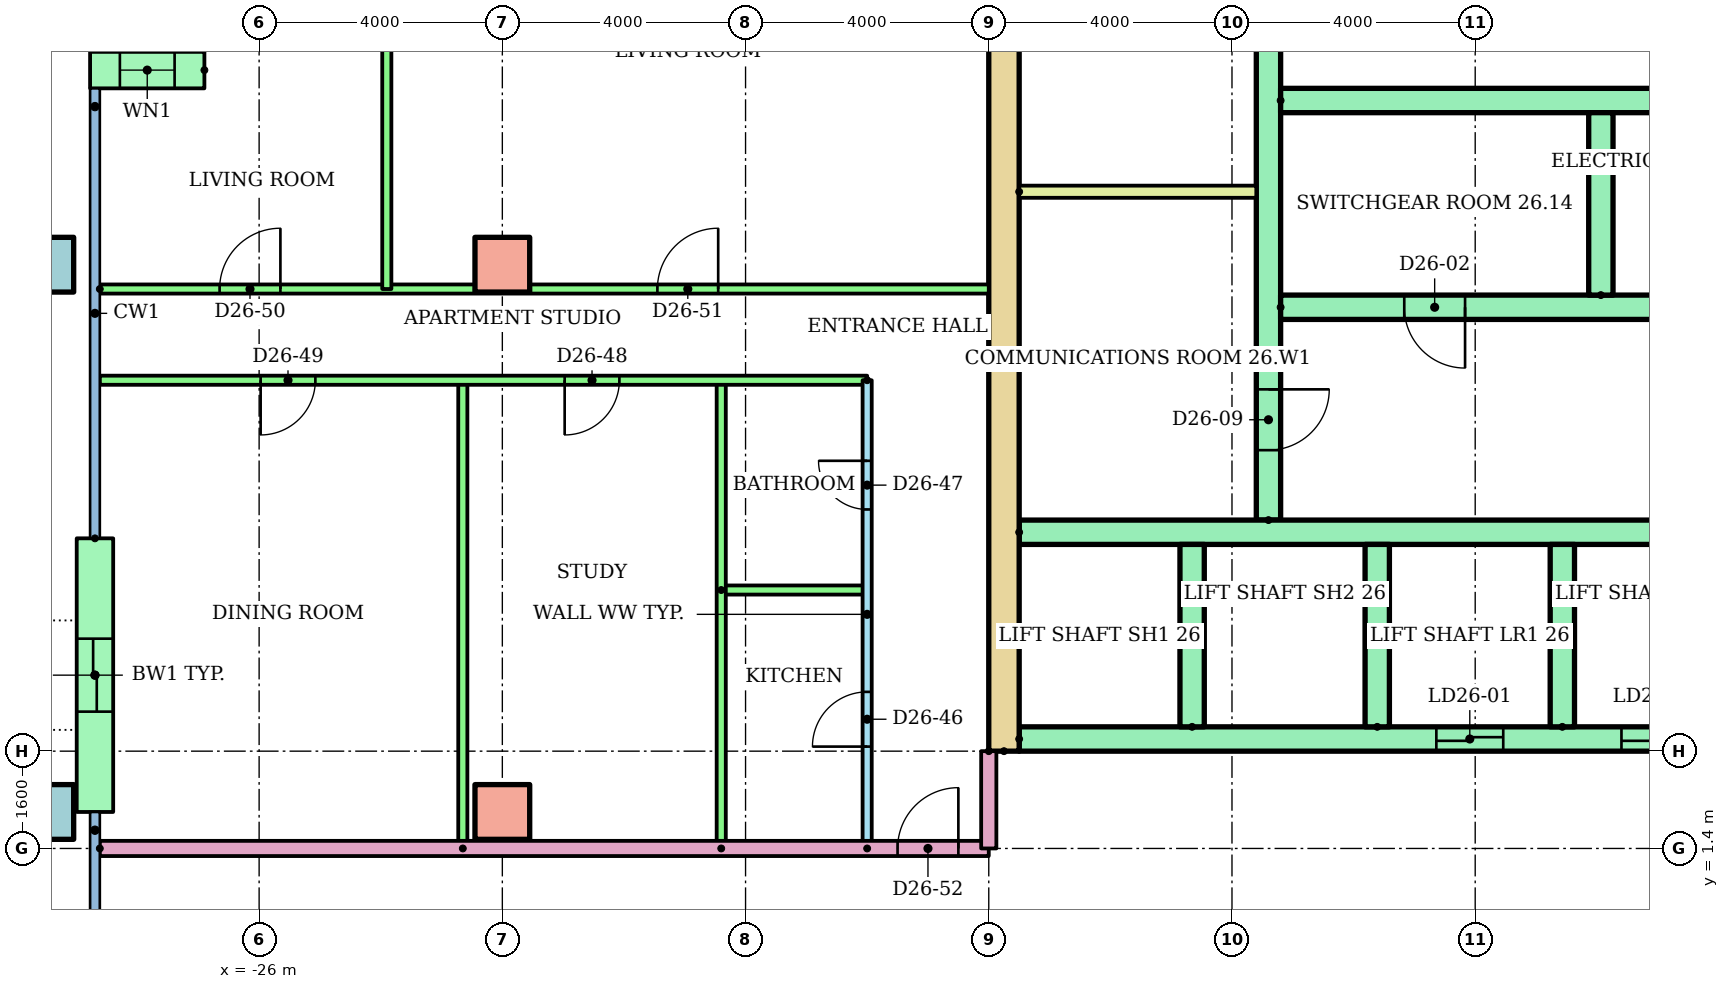
"""IFC4 building model, lengths in metres.
Left out: names, types, materials, properties, quantities, classifications, styles, units other than length and angle.
Written with IfcOpenShell. Run it as: python <this file> out.ifc"""

import sys

from ifc_helpers import new_model, si_unit, direction, frame, frame_2d, origin, origin_2d, place, context, subcontext, project, spatial, rectangle, hollow_rectangle, extrude, element, fill, save


model = new_model("IFC4")
c1 = context("Model", 3, precision=1e-05, world=origin(), true_north=direction((0.0, 1.0)))
c2 = subcontext(c1, "Body", "Model", "MODEL_VIEW")
j1 = project(units=[si_unit("LENGTHUNIT", "METRE"), si_unit("PLANEANGLEUNIT", "RADIAN")], contexts=[c1])
p1 = place(None, origin())
s1 = spatial("IfcSite", under=j1, at=p1, CompositionType="ELEMENT")
p2 = place(p1, origin())
s2 = spatial("IfcBuilding", under=s1, at=p2, CompositionType="ELEMENT")
p3 = place(p2, frame((0.0, 0.0, 99.9)))
s3 = spatial("IfcBuildingStorey", under=s2, at=p3, CompositionType="ELEMENT", Elevation=99.9)
p4 = place(p3, frame((-29.5, 2.0, 0.0)))
e1 = element("IfcColumn", 1, at=p4, inside=s3, PredefinedType="COLUMN", context=c2, shape_type="SweptSolid", body=[
    extrude(hollow_rectangle(XDim=0.9, YDim=0.9, WallThickness=0.045, at=origin_2d()), origin(), (0.0, 0.0, 1.0), 3.2),
])
p5 = place(p3, frame((-22.0, 2.0, 0.0)))
e2 = element("IfcColumn", 2, at=p5, inside=s3, PredefinedType="COLUMN", context=c2, shape_type="SweptSolid", body=[
    extrude(rectangle(XDim=0.9, YDim=0.9, at=origin_2d()), origin(), (0.0, 0.0, 1.0), 3.2),
])
p6 = place(p3, frame((-29.5, 11.0, 0.0)))
e3 = element("IfcColumn", 3, at=p6, inside=s3, PredefinedType="COLUMN", context=c2, shape_type="SweptSolid", body=[
    extrude(hollow_rectangle(XDim=0.9, YDim=0.9, WallThickness=0.045, at=origin_2d()), origin(), (0.0, 0.0, 1.0), 3.2),
])
p7 = place(p3, frame((-22.0, 11.0, 0.0)))
e4 = element("IfcColumn", 4, at=p7, inside=s3, PredefinedType="COLUMN", context=c2, shape_type="SweptSolid", body=[
    extrude(rectangle(XDim=0.9, YDim=0.9, at=origin_2d()), origin(), (0.0, 0.0, 1.0), 3.2),
])
p8 = place(p3, frame((-26.9, 14.2, 0.0), z_axis=(0.0, 0.0, 1.0), x_axis=(-1.0, 0.0, 0.0)))
e5 = element("IfcWall", 5, at=p8, inside=s3, PredefinedType="STANDARD", context=c2, shape_type="SweptSolid", body=[
    extrude(rectangle(XDim=1.88, YDim=0.6, at=frame_2d((0.94, 0.0))), origin(), (0.0, 0.0, 1.0), 2.92),
])
p9 = place(p8, frame((0.49, 0.0, 0.9)))
e6 = element("IfcOpeningElement", 6, at=p9, cuts=e5, PredefinedType="OPENING", context=c2, shape_type="SweptSolid", body=[
    extrude(rectangle(XDim=0.9, YDim=1.5, at=frame_2d((0.45, 0.75))), frame((0.0, 0.31, 0.0), z_axis=(0.0, -1.0, 0.0), x_axis=(1.0, 0.0, 0.0)), (0.0, 0.0, 1.0), 0.62),
])
p10 = place(p3, frame((-28.7, 6.5, 0.0), z_axis=(0.0, 0.0, 1.0), x_axis=(0.0, -1.0, 0.0)))
e7 = element("IfcWall", 7, at=p10, inside=s3, PredefinedType="STANDARD", context=c2, shape_type="SweptSolid", body=[
    extrude(rectangle(XDim=4.5, YDim=0.6, at=frame_2d((2.25, 0.0))), origin(), (0.0, 0.0, 1.0), 2.92),
])
p11 = place(p10, frame((1.65, 0.0, 0.0)))
e8 = element("IfcOpeningElement", 8, at=p11, cuts=e7, PredefinedType="OPENING", context=c2, shape_type="SweptSolid", body=[
    extrude(rectangle(XDim=1.2, YDim=2.1, at=frame_2d((0.6, 1.05))), frame((0.0, 0.31, 0.0), z_axis=(0.0, -1.0, 0.0), x_axis=(1.0, 0.0, 0.0)), (0.0, 0.0, 1.0), 0.62),
])
p12 = place(p3, frame((-13.75, 3.0, 0.0), z_axis=(0.0, 0.0, 1.0), x_axis=(0.0, 1.0, 0.0)))
e9 = element("IfcWall", 9, at=p12, inside=s3, PredefinedType="SHEAR", context=c2, shape_type="SweptSolid", body=[
    extrude(rectangle(XDim=17.0, YDim=0.5, at=frame_2d((8.5, 0.0))), origin(), (0.0, 0.0, 1.0), 2.92),
])
p13 = place(p3, frame((-9.4, 6.8, 0.0), z_axis=(0.0, 0.0, 1.0), x_axis=(0.0, 1.0, 0.0)))
e10 = element("IfcWall", 10, at=p13, inside=s3, PredefinedType="SHEAR", context=c2, shape_type="SweptSolid", body=[
    extrude(rectangle(XDim=12.7, YDim=0.4, at=frame_2d((6.35, 0.0))), origin(), (0.0, 0.0, 1.0), 2.92),
])
p14 = place(p13, frame((1.15, 0.0, 0.0)))
e11 = element("IfcOpeningElement", 11, at=p14, cuts=e10, PredefinedType="OPENING", context=c2, shape_type="SweptSolid", body=[
    extrude(rectangle(XDim=1.0, YDim=2.1, at=frame_2d((0.5, 1.05))), frame((0.0, 0.21, 0.0), z_axis=(0.0, -1.0, 0.0), x_axis=(1.0, 0.0, 0.0)), (0.0, 0.0, 1.0), 0.42),
])
p15 = place(p13, frame((7.925, 0.0, 0.0)))
e12 = element("IfcOpeningElement", 12, at=p15, cuts=e10, PredefinedType="OPENING", context=c2, shape_type="SweptSolid", body=[
    extrude(rectangle(XDim=1.0, YDim=2.1, at=frame_2d((0.5, 1.05))), frame((0.0, 0.21, 0.0), z_axis=(0.0, -1.0, 0.0), x_axis=(1.0, 0.0, 0.0)), (0.0, 0.0, 1.0), 0.42),
])
p16 = place(p3, frame((-13.5, 3.2, 0.0)))
e13 = element("IfcWall", 13, at=p16, inside=s3, PredefinedType="SHEAR", context=c2, shape_type="SweptSolid", body=[
    extrude(rectangle(XDim=27.0, YDim=0.4, at=frame_2d((13.5, 0.0))), origin(), (0.0, 0.0, 1.0), 2.92),
])
p17 = place(p16, frame((6.861, 0.0, 0.0)))
e14 = element("IfcOpeningElement", 14, at=p17, cuts=e13, PredefinedType="OPENING", context=c2, shape_type="SweptSolid", body=[
    extrude(rectangle(XDim=1.1, YDim=2.1, at=frame_2d((0.55, 1.05))), frame((0.0, 0.21, 0.0), z_axis=(0.0, -1.0, 0.0), x_axis=(1.0, 0.0, 0.0)), (0.0, 0.0, 1.0), 0.42),
])
p18 = place(p16, frame((9.906, 0.0, 0.0)))
e15 = element("IfcOpeningElement", 15, at=p18, cuts=e13, PredefinedType="OPENING", context=c2, shape_type="SweptSolid", body=[
    extrude(rectangle(XDim=1.1, YDim=2.1, at=frame_2d((0.55, 1.05))), frame((0.0, 0.21, 0.0), z_axis=(0.0, -1.0, 0.0), x_axis=(1.0, 0.0, 0.0)), (0.0, 0.0, 1.0), 0.42),
])
p19 = place(p16, frame((15.994, 0.0, 0.0)))
e16 = element("IfcOpeningElement", 16, at=p19, cuts=e13, PredefinedType="OPENING", context=c2, shape_type="SweptSolid", body=[
    extrude(rectangle(XDim=1.1, YDim=2.1, at=frame_2d((0.55, 1.05))), frame((0.0, 0.21, 0.0), z_axis=(0.0, -1.0, 0.0), x_axis=(1.0, 0.0, 0.0)), (0.0, 0.0, 1.0), 0.42),
])
p20 = place(p16, frame((19.039, 0.0, 0.0)))
e17 = element("IfcOpeningElement", 17, at=p20, cuts=e13, PredefinedType="OPENING", context=c2, shape_type="SweptSolid", body=[
    extrude(rectangle(XDim=1.1, YDim=2.1, at=frame_2d((0.55, 1.05))), frame((0.0, 0.21, 0.0), z_axis=(0.0, -1.0, 0.0), x_axis=(1.0, 0.0, 0.0)), (0.0, 0.0, 1.0), 0.42),
])
p21 = place(p16, frame((12.6, 0.0, 0.0)))
e18 = element("IfcOpeningElement", 18, at=p21, cuts=e13, PredefinedType="OPENING", context=c2, shape_type="SweptSolid", body=[
    extrude(rectangle(XDim=1.8, YDim=2.1, at=frame_2d((0.9, 1.05))), frame((0.0, 0.21, 0.0), z_axis=(0.0, -1.0, 0.0), x_axis=(1.0, 0.0, 0.0)), (0.0, 0.0, 1.0), 0.42),
])
p22 = place(p3, frame((-13.5, 6.6, 0.0)))
e19 = element("IfcWall", 19, at=p22, inside=s3, PredefinedType="SHEAR", context=c2, shape_type="SweptSolid", body=[
    extrude(rectangle(XDim=11.978, YDim=0.4, at=frame_2d((5.989, 0.0))), origin(), (0.0, 0.0, 1.0), 2.92),
])
for number, where, z_axis, x_axis in (
    (20, (-10.656, 3.4, 0.0), (0.0, 0.0, 1.0), (0.0, 1.0, 0.0)),
    (21, (-7.611, 3.4, 0.0), (0.0, 0.0, 1.0), (0.0, 1.0, 0.0)),
    (22, (-4.567, 3.4, 0.0), (0.0, 0.0, 1.0), (0.0, 1.0, 0.0)),
):
    element("IfcWall", number, at=place(p3, frame(where, z_axis=z_axis, x_axis=x_axis)), inside=s3, PredefinedType="SHEAR", context=c2, shape_type="SweptSolid", body=[
        extrude(rectangle(XDim=3.0, YDim=0.4, at=frame_2d((1.5, 0.0))), origin(), (0.0, 0.0, 1.0), 2.92),
    ])
p23 = place(p3, frame((-9.2, 10.3, 0.0)))
e23 = element("IfcWall", 23, at=p23, inside=s3, PredefinedType="SHEAR", context=c2, shape_type="SweptSolid", body=[
    extrude(rectangle(XDim=8.0, YDim=0.4, at=frame_2d((4.0, 0.0))), origin(), (0.0, 0.0, 1.0), 2.92),
])
p24 = place(p23, frame((2.033, 0.0, 0.0)))
e24 = element("IfcOpeningElement", 24, at=p24, cuts=e23, PredefinedType="OPENING", context=c2, shape_type="SweptSolid", body=[
    extrude(rectangle(XDim=1.0, YDim=2.1, at=frame_2d((0.5, 1.05))), frame((0.0, 0.21, 0.0), z_axis=(0.0, -1.0, 0.0), x_axis=(1.0, 0.0, 0.0)), (0.0, 0.0, 1.0), 0.42),
])
p25 = place(p23, frame((6.133, 0.0, 0.0)))
e25 = element("IfcOpeningElement", 25, at=p25, cuts=e23, PredefinedType="OPENING", context=c2, shape_type="SweptSolid", body=[
    extrude(rectangle(XDim=1.0, YDim=2.1, at=frame_2d((0.5, 1.05))), frame((0.0, 0.21, 0.0), z_axis=(0.0, -1.0, 0.0), x_axis=(1.0, 0.0, 0.0)), (0.0, 0.0, 1.0), 0.42),
])
p26 = place(p3, frame((-9.2, 13.7, 0.0)))
e26 = element("IfcWall", 26, at=p26, inside=s3, PredefinedType="SHEAR", context=c2, shape_type="SweptSolid", body=[
    extrude(rectangle(XDim=8.0, YDim=0.4, at=frame_2d((4.0, 0.0))), origin(), (0.0, 0.0, 1.0), 2.92),
])
p27 = place(p3, frame((-3.933, 10.5, 0.0), z_axis=(0.0, 0.0, 1.0), x_axis=(0.0, 1.0, 0.0)))
e27 = element("IfcWall", 27, at=p27, inside=s3, PredefinedType="SHEAR", context=c2, shape_type="SweptSolid", body=[
    extrude(rectangle(XDim=3.0, YDim=0.4, at=frame_2d((1.5, 0.0))), origin(), (0.0, 0.0, 1.0), 2.92),
])
p28 = place(p3, frame((-13.5, 12.2, 0.0)))
e28 = element("IfcWall", 28, at=p28, inside=s3, PredefinedType="PARTITIONING", context=c2, shape_type="SweptSolid", body=[
    extrude(rectangle(XDim=3.9, YDim=0.2, at=frame_2d((1.95, 0.0))), origin(), (0.0, 0.0, 1.0), 2.92),
])
p29 = place(p3, frame((-16.0, 1.4, 0.0), z_axis=(0.0, 0.0, 1.0), x_axis=(0.0, 1.0, 0.0)))
e29 = element("IfcWall", 29, at=p29, inside=s3, PredefinedType="PARTITIONING", context=c2, shape_type="SweptSolid", body=[
    extrude(rectangle(XDim=7.7, YDim=0.15, at=frame_2d((3.85, 0.0))), origin(), (0.0, 0.0, 1.0), 2.4),
])
p30 = place(p29, frame((1.675, 0.0, 0.0)))
e30 = element("IfcOpeningElement", 30, at=p30, cuts=e29, PredefinedType="OPENING", context=c2, shape_type="SweptSolid", body=[
    extrude(rectangle(XDim=0.9, YDim=2.1, at=frame_2d((0.45, 1.05))), frame((0.0, 0.085, 0.0), z_axis=(0.0, -1.0, 0.0), x_axis=(1.0, 0.0, 0.0)), (0.0, 0.0, 1.0), 0.17),
])
p31 = place(p29, frame((5.575, 0.0, 0.0)))
e31 = element("IfcOpeningElement", 31, at=p31, cuts=e29, PredefinedType="OPENING", context=c2, shape_type="SweptSolid", body=[
    extrude(rectangle(XDim=0.8, YDim=2.1, at=frame_2d((0.4, 1.05))), frame((0.0, 0.085, 0.0), z_axis=(0.0, -1.0, 0.0), x_axis=(1.0, 0.0, 0.0)), (0.0, 0.0, 1.0), 0.17),
])
p32 = place(p3, frame((-18.4, 5.65, 0.0)))
e32 = element("IfcWall", 32, at=p32, inside=s3, PredefinedType="PARTITIONING", context=c2, shape_type="SweptSolid", body=[
    extrude(rectangle(XDim=2.4, YDim=0.15, at=frame_2d((1.2, 0.0))), origin(), (0.0, 0.0, 1.0), 2.4),
])
for number, where, z_axis, x_axis in (
    (33, (-18.4, 1.4, 0.0), (0.0, 0.0, 1.0), (0.0, 1.0, 0.0)),
    (34, (-22.65, 1.4, 0.0), (0.0, 0.0, 1.0), (0.0, 1.0, 0.0)),
):
    element("IfcWall", number, at=place(p3, frame(where, z_axis=z_axis, x_axis=x_axis)), inside=s3, PredefinedType="PARTITIONING", context=c2, shape_type="SweptSolid", body=[
        extrude(rectangle(XDim=7.7, YDim=0.15, at=frame_2d((3.85, 0.0))), origin(), (0.0, 0.0, 1.0), 2.4),
    ])
p33 = place(p3, frame((-16.0, 9.1, 0.0), z_axis=(0.0, 0.0, 1.0), x_axis=(-1.0, 0.0, 0.0)))
e35 = element("IfcWall", 35, at=p33, inside=s3, PredefinedType="PARTITIONING", context=c2, shape_type="SweptSolid", body=[
    extrude(rectangle(XDim=12.62, YDim=0.15, at=frame_2d((6.31, 0.0))), origin(), (0.0, 0.0, 1.0), 2.4),
])
p34 = place(p33, frame((4.075, 0.0, 0.0)))
e36 = element("IfcOpeningElement", 36, at=p34, cuts=e35, PredefinedType="OPENING", context=c2, shape_type="SweptSolid", body=[
    extrude(rectangle(XDim=0.9, YDim=2.1, at=frame_2d((0.45, 1.05))), frame((0.0, 0.085, 0.0), z_axis=(0.0, -1.0, 0.0), x_axis=(1.0, 0.0, 0.0)), (0.0, 0.0, 1.0), 0.17),
])
p35 = place(p33, frame((9.075, 0.0, 0.0)))
e37 = element("IfcOpeningElement", 37, at=p35, cuts=e35, PredefinedType="OPENING", context=c2, shape_type="SweptSolid", body=[
    extrude(rectangle(XDim=0.9, YDim=2.1, at=frame_2d((0.45, 1.05))), frame((0.0, 0.085, 0.0), z_axis=(0.0, -1.0, 0.0), x_axis=(1.0, 0.0, 0.0)), (0.0, 0.0, 1.0), 0.17),
])
p36 = place(p3, frame((-28.62, 10.6, 0.0)))
e38 = element("IfcWall", 38, at=p36, inside=s3, PredefinedType="PARTITIONING", context=c2, shape_type="SweptSolid", body=[
    extrude(rectangle(XDim=14.62, YDim=0.15, at=frame_2d((7.31, 0.0))), origin(), (0.0, 0.0, 1.0), 2.4),
])
p37 = place(p36, frame((1.97, 0.0, 0.0)))
e39 = element("IfcOpeningElement", 39, at=p37, cuts=e38, PredefinedType="OPENING", context=c2, shape_type="SweptSolid", body=[
    extrude(rectangle(XDim=1.0, YDim=2.1, at=frame_2d((0.5, 1.05))), frame((0.0, 0.085, 0.0), z_axis=(0.0, -1.0, 0.0), x_axis=(1.0, 0.0, 0.0)), (0.0, 0.0, 1.0), 0.17),
])
p38 = place(p36, frame((9.17, 0.0, 0.0)))
e40 = element("IfcOpeningElement", 40, at=p38, cuts=e38, PredefinedType="OPENING", context=c2, shape_type="SweptSolid", body=[
    extrude(rectangle(XDim=1.0, YDim=2.1, at=frame_2d((0.5, 1.05))), frame((0.0, 0.085, 0.0), z_axis=(0.0, -1.0, 0.0), x_axis=(1.0, 0.0, 0.0)), (0.0, 0.0, 1.0), 0.17),
])
p39 = place(p3, frame((-23.9, 16.82, 0.0), z_axis=(0.0, 0.0, 1.0), x_axis=(0.0, -1.0, 0.0)))
e41 = element("IfcWall", 41, at=p39, inside=s3, PredefinedType="PARTITIONING", context=c2, shape_type="SweptSolid", body=[
    extrude(rectangle(XDim=6.22, YDim=0.15, at=frame_2d((3.11, 0.0))), origin(), (0.0, 0.0, 1.0), 2.4),
])
p40 = place(p3, frame((-28.62, 1.4, 0.0)))
e42 = element("IfcWall", 42, at=p40, inside=s3, PredefinedType="PARTITIONING", context=c2, shape_type="SweptSolid", body=[
    extrude(rectangle(XDim=14.62, YDim=0.25, at=frame_2d((7.31, 0.0))), origin(), (0.0, 0.0, 1.0), 2.4),
])
p41 = place(p40, frame((13.12, 0.0, 0.0)))
e43 = element("IfcOpeningElement", 43, at=p41, cuts=e42, PredefinedType="OPENING", context=c2, shape_type="SweptSolid", body=[
    extrude(rectangle(XDim=1.0, YDim=2.1, at=frame_2d((0.5, 1.05))), frame((0.0, 0.135, 0.0), z_axis=(0.0, -1.0, 0.0), x_axis=(1.0, 0.0, 0.0)), (0.0, 0.0, 1.0), 0.27),
])
p42 = place(p3, frame((-14.0, 3.0, 0.0), z_axis=(0.0, 0.0, 1.0), x_axis=(0.0, -1.0, 0.0)))
e44 = element("IfcWall", 44, at=p42, inside=s3, PredefinedType="PARTITIONING", context=c2, shape_type="SweptSolid", body=[
    extrude(rectangle(XDim=1.6, YDim=0.25, at=frame_2d((0.8, 0.0))), origin(), (0.0, 0.0, 1.0), 2.4),
])
p43 = place(p9, origin())
e45 = element("IfcWindow", 45, at=p43, inside=s3, PartitioningType="SINGLE_PANEL", PredefinedType="WINDOW", context=c2, shape_type="SweptSolid", body=[
    extrude(rectangle(XDim=0.9, YDim=1.5, at=frame_2d((0.45, 0.75))), frame((0.0, 0.03, 0.0), z_axis=(0.0, -1.0, 0.0), x_axis=(1.0, 0.0, 0.0)), (0.0, 0.0, 1.0), 0.06),
])
fill(e6, e45)
p44 = place(p17, origin())
e46 = element("IfcDoor", 46, at=p44, inside=s3, OperationType="SLIDING_TO_LEFT", PredefinedType="DOOR", context=c2, shape_type="SweptSolid", body=[
    extrude(rectangle(XDim=1.1, YDim=2.1, at=frame_2d((0.55, 1.05))), frame((0.0, 0.025, 0.0), z_axis=(0.0, -1.0, 0.0), x_axis=(1.0, 0.0, 0.0)), (0.0, 0.0, 1.0), 0.05),
])
fill(e14, e46)
p45 = place(p18, origin())
e47 = element("IfcDoor", 47, at=p45, inside=s3, OperationType="SLIDING_TO_LEFT", PredefinedType="DOOR", context=c2, shape_type="SweptSolid", body=[
    extrude(rectangle(XDim=1.1, YDim=2.1, at=frame_2d((0.55, 1.05))), frame((0.0, 0.025, 0.0), z_axis=(0.0, -1.0, 0.0), x_axis=(1.0, 0.0, 0.0)), (0.0, 0.0, 1.0), 0.05),
])
fill(e15, e47)
p46 = place(p24, frame((1.0, 0.0, 0.0), z_axis=(0.0, 0.0, 1.0), x_axis=(-1.0, 0.0, 0.0)))
e48 = element("IfcDoor", 48, at=p46, inside=s3, OperationType="SINGLE_SWING_RIGHT", PredefinedType="DOOR", context=c2, shape_type="SweptSolid", body=[
    extrude(rectangle(XDim=1.0, YDim=2.1, at=frame_2d((0.5, 1.05))), frame((0.0, 0.025, 0.0), z_axis=(0.0, -1.0, 0.0), x_axis=(1.0, 0.0, 0.0)), (0.0, 0.0, 1.0), 0.05),
])
fill(e24, e48)
p47 = place(p14, frame((1.0, 0.0, 0.0), z_axis=(0.0, 0.0, 1.0), x_axis=(-1.0, 0.0, 0.0)))
e49 = element("IfcDoor", 49, at=p47, inside=s3, OperationType="SINGLE_SWING_RIGHT", PredefinedType="DOOR", context=c2, shape_type="SweptSolid", body=[
    extrude(rectangle(XDim=1.0, YDim=2.1, at=frame_2d((0.5, 1.05))), frame((0.0, 0.025, 0.0), z_axis=(0.0, -1.0, 0.0), x_axis=(1.0, 0.0, 0.0)), (0.0, 0.0, 1.0), 0.05),
])
fill(e11, e49)
p48 = place(p30, origin())
e50 = element("IfcDoor", 50, at=p48, inside=s3, OperationType="SINGLE_SWING_LEFT", PredefinedType="DOOR", context=c2, shape_type="SweptSolid", body=[
    extrude(rectangle(XDim=0.9, YDim=2.1, at=frame_2d((0.45, 1.05))), frame((0.0, 0.025, 0.0), z_axis=(0.0, -1.0, 0.0), x_axis=(1.0, 0.0, 0.0)), (0.0, 0.0, 1.0), 0.05),
])
fill(e30, e50)
p49 = place(p31, origin())
e51 = element("IfcDoor", 51, at=p49, inside=s3, OperationType="SINGLE_SWING_RIGHT", PredefinedType="DOOR", context=c2, shape_type="SweptSolid", body=[
    extrude(rectangle(XDim=0.8, YDim=2.1, at=frame_2d((0.4, 1.05))), frame((0.0, 0.025, 0.0), z_axis=(0.0, -1.0, 0.0), x_axis=(1.0, 0.0, 0.0)), (0.0, 0.0, 1.0), 0.05),
])
fill(e31, e51)
p50 = place(p34, origin())
e52 = element("IfcDoor", 52, at=p50, inside=s3, OperationType="SINGLE_SWING_RIGHT", PredefinedType="DOOR", context=c2, shape_type="SweptSolid", body=[
    extrude(rectangle(XDim=0.9, YDim=2.1, at=frame_2d((0.45, 1.05))), frame((0.0, 0.025, 0.0), z_axis=(0.0, -1.0, 0.0), x_axis=(1.0, 0.0, 0.0)), (0.0, 0.0, 1.0), 0.05),
])
fill(e36, e52)
p51 = place(p35, origin())
e53 = element("IfcDoor", 53, at=p51, inside=s3, OperationType="SINGLE_SWING_RIGHT", PredefinedType="DOOR", context=c2, shape_type="SweptSolid", body=[
    extrude(rectangle(XDim=0.9, YDim=2.1, at=frame_2d((0.45, 1.05))), frame((0.0, 0.025, 0.0), z_axis=(0.0, -1.0, 0.0), x_axis=(1.0, 0.0, 0.0)), (0.0, 0.0, 1.0), 0.05),
])
fill(e37, e53)
p52 = place(p37, origin())
e54 = element("IfcDoor", 54, at=p52, inside=s3, OperationType="SINGLE_SWING_RIGHT", PredefinedType="DOOR", context=c2, shape_type="SweptSolid", body=[
    extrude(rectangle(XDim=1.0, YDim=2.1, at=frame_2d((0.5, 1.05))), frame((0.0, 0.025, 0.0), z_axis=(0.0, -1.0, 0.0), x_axis=(1.0, 0.0, 0.0)), (0.0, 0.0, 1.0), 0.05),
])
fill(e39, e54)
p53 = place(p38, origin())
e55 = element("IfcDoor", 55, at=p53, inside=s3, OperationType="SINGLE_SWING_RIGHT", PredefinedType="DOOR", context=c2, shape_type="SweptSolid", body=[
    extrude(rectangle(XDim=1.0, YDim=2.1, at=frame_2d((0.5, 1.05))), frame((0.0, 0.025, 0.0), z_axis=(0.0, -1.0, 0.0), x_axis=(1.0, 0.0, 0.0)), (0.0, 0.0, 1.0), 0.05),
])
fill(e40, e55)
p54 = place(p41, origin())
e56 = element("IfcDoor", 56, at=p54, inside=s3, OperationType="SINGLE_SWING_RIGHT", PredefinedType="DOOR", context=c2, shape_type="SweptSolid", body=[
    extrude(rectangle(XDim=1.0, YDim=2.1, at=frame_2d((0.5, 1.05))), frame((0.0, 0.025, 0.0), z_axis=(0.0, -1.0, 0.0), x_axis=(1.0, 0.0, 0.0)), (0.0, 0.0, 1.0), 0.05),
])
fill(e43, e56)
p55 = place(p11, origin())
e57 = element("IfcDoor", 57, at=p55, inside=s3, OperationType="SLIDING_TO_LEFT", PredefinedType="DOOR", context=c2, shape_type="SweptSolid", body=[
    extrude(rectangle(XDim=1.2, YDim=2.1, at=frame_2d((0.6, 1.05))), frame((0.0, 0.025, 0.0), z_axis=(0.0, -1.0, 0.0), x_axis=(1.0, 0.0, 0.0)), (0.0, 0.0, 1.0), 0.05),
])
fill(e8, e57)
save(model, sys.argv[1])
